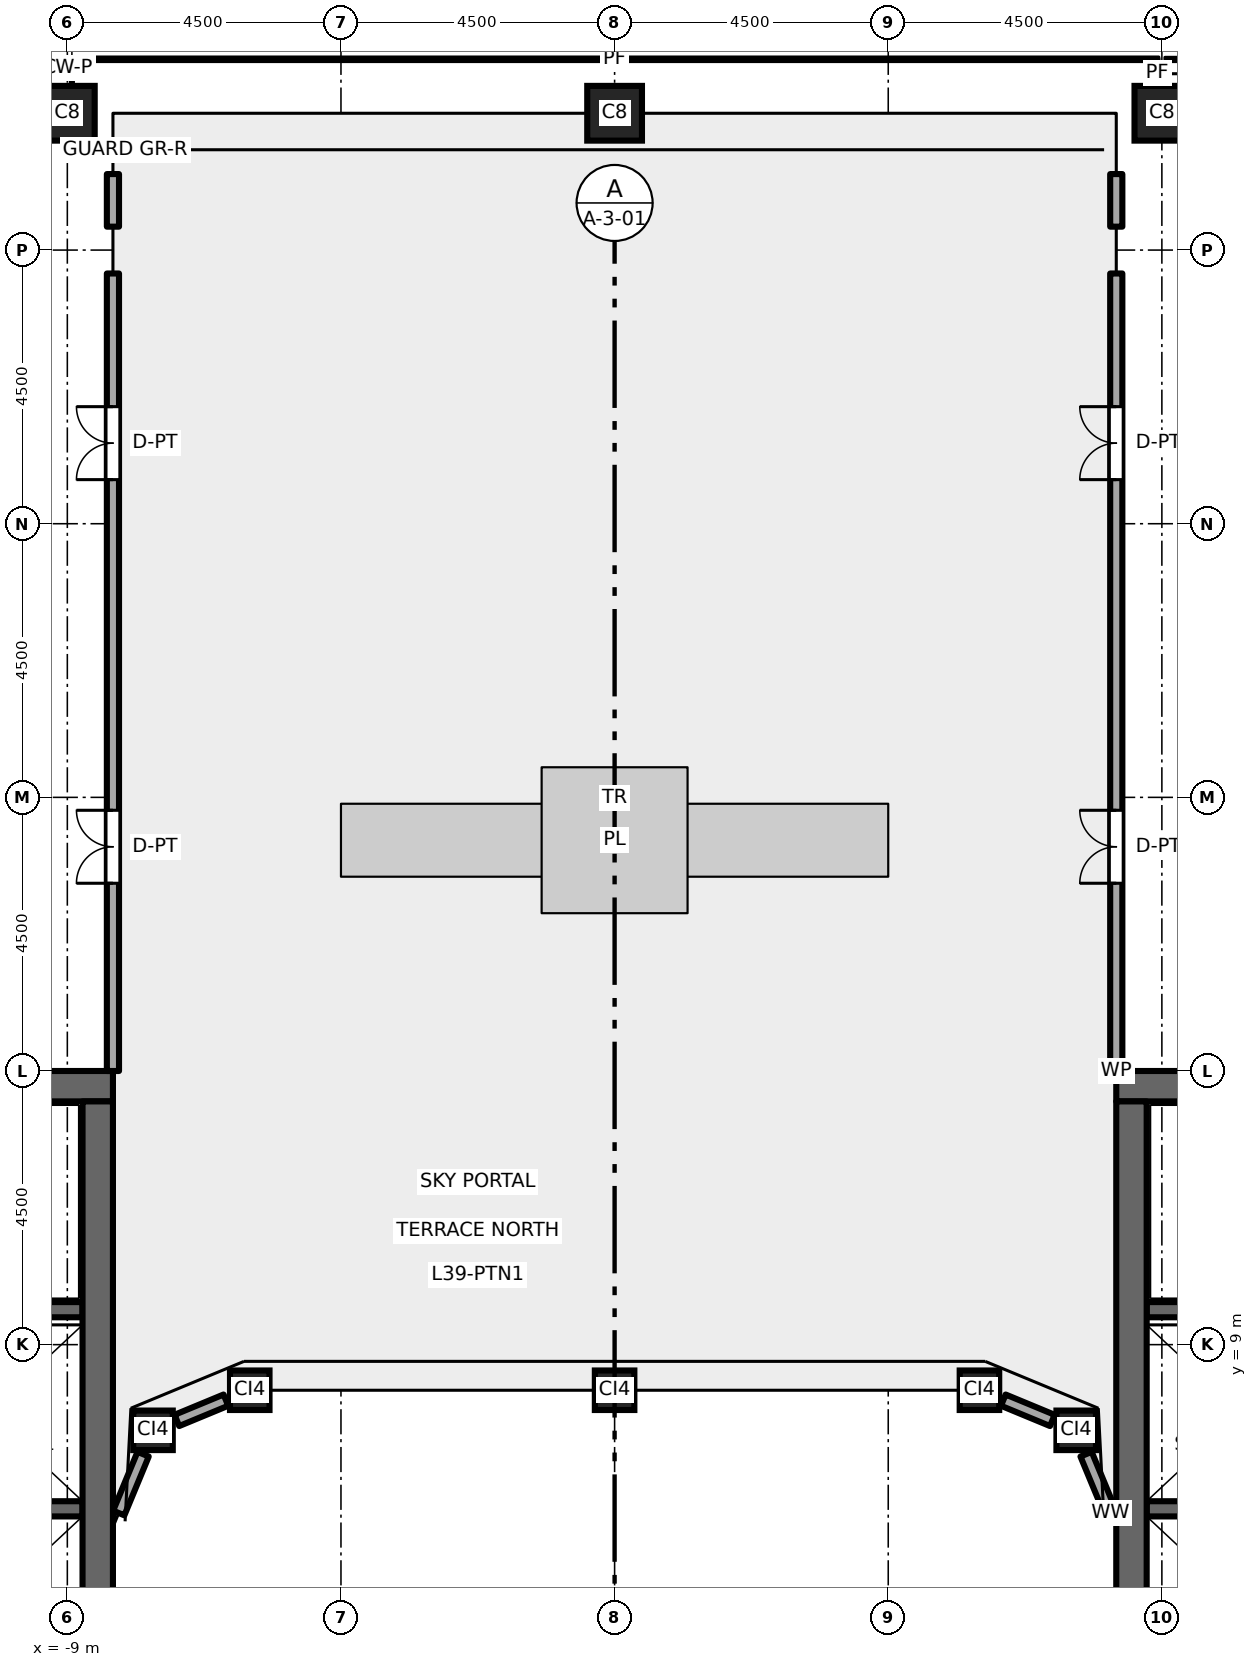
"""IFC4 building model, lengths in metres.
Left out: names, types, materials, properties, quantities, classifications, styles, units other than length and angle.
Written with IfcOpenShell. Run it as: python <this file> out.ifc"""

import sys

from ifc_helpers import new_model, si_unit, direction, frame, frame_2d, origin, origin_2d, place, context, subcontext, project, spatial, rectangle, hollow_rectangle, extrude, element, fill, save


model = new_model("IFC4")
c1 = context("Model", 3, precision=1e-05, world=origin(), true_north=direction((0.0, 1.0)))
c2 = subcontext(c1, "Body", "Model", "MODEL_VIEW")
j1 = project(units=[si_unit("LENGTHUNIT", "METRE"), si_unit("PLANEANGLEUNIT", "RADIAN")], contexts=[c1])
p1 = place(None, origin())
s1 = spatial("IfcSite", under=j1, at=p1, CompositionType="ELEMENT")
p2 = place(p1, origin())
s2 = spatial("IfcBuilding", under=s1, at=p2, CompositionType="ELEMENT")
p3 = place(p2, frame((0.0, 0.0, 181.2)))
s3 = spatial("IfcBuildingStorey", under=s2, at=p3, CompositionType="ELEMENT", Elevation=181.2)
for number, where, z_axis, x_axis in (
    (1, (9.0, 29.25, 0.0), (0.0, 0.0, 1.0), (1.0, 0.0, 0.0)),
    (2, (0.0, 29.25, 0.0), (0.0, 0.0, 1.0), (1.0, 0.0, 0.0)),
    (3, (-9.0, 29.25, 0.0), (0.0, 0.0, 1.0), (1.0, 0.0, 0.0)),
):
    element("IfcColumn", number, at=place(p3, frame(where, z_axis=z_axis, x_axis=x_axis)), inside=s3, PredefinedType="COLUMN", context=c2, shape_type="SweptSolid", body=[
        extrude(hollow_rectangle(XDim=0.9, YDim=0.9, WallThickness=0.05, at=origin_2d()), origin(), (0.0, 0.0, 1.0), 6.0),
    ])
for number, where, z_axis, x_axis in (
    (4, (-7.591, 7.591, 0.0), (0.0, 0.0, 1.0), (1.0, 0.0, 0.0)),
    (5, (-6.0, 8.25, 0.0), (0.0, 0.0, 1.0), (1.0, 0.0, 0.0)),
    (6, (0.0, 8.25, 0.0), (0.0, 0.0, 1.0), (1.0, 0.0, 0.0)),
    (7, (6.0, 8.25, 0.0), (0.0, 0.0, 1.0), (1.0, 0.0, 0.0)),
    (8, (7.591, 7.591, 0.0), (0.0, 0.0, 1.0), (1.0, 0.0, 0.0)),
):
    element("IfcColumn", number, at=place(p3, frame(where, z_axis=z_axis, x_axis=x_axis)), inside=s3, PredefinedType="COLUMN", context=c2, shape_type="SweptSolid", body=[
        extrude(hollow_rectangle(XDim=0.65, YDim=0.65, WallThickness=0.036, at=origin_2d()), origin(), (0.0, 0.0, 1.0), 6.0),
    ])
p4 = place(p3, frame((-8.75, 6.3, 0.0), z_axis=(0.0, 0.0, 1.0), x_axis=(-1.0, 0.0, 0.0)))
e9 = element("IfcWall", 9, at=p4, inside=s3, PredefinedType="SHEAR", context=c2, shape_type="SweptSolid", body=[
    extrude(rectangle(XDim=3.1, YDim=0.25, at=frame_2d((1.55, 0.0))), origin(), (0.0, 0.0, 1.0), 5.8),
])
p5 = place(p3, frame((-8.75, 9.575, 0.0), z_axis=(0.0, 0.0, 1.0), x_axis=(-1.0, 0.0, 0.0)))
e10 = element("IfcWall", 10, at=p5, inside=s3, PredefinedType="SHEAR", context=c2, shape_type="SweptSolid", body=[
    extrude(rectangle(XDim=8.0, YDim=0.25, at=frame_2d((4.0, 0.0))), origin(), (0.0, 0.0, 1.0), 5.8),
])
p6 = place(p5, frame((6.65, 0.0, 0.0)))
e11 = element("IfcOpeningElement", 11, at=p6, cuts=e10, PredefinedType="OPENING", context=c2, shape_type="SweptSolid", body=[
    extrude(rectangle(XDim=1.1, YDim=2.1, at=frame_2d((0.55, 1.05))), frame((0.0, 0.135, 0.0), z_axis=(0.0, -1.0, 0.0), x_axis=(1.0, 0.0, 0.0)), (0.0, 0.0, 1.0), 0.27),
])
p7 = place(p3, frame((-8.25, 13.25, 0.0), z_axis=(0.0, 0.0, 1.0), x_axis=(-1.0, 0.0, 0.0)))
e12 = element("IfcWall", 12, at=p7, inside=s3, PredefinedType="SHEAR", context=c2, shape_type="SweptSolid", body=[
    extrude(rectangle(XDim=13.5, YDim=0.5, at=frame_2d((6.75, 0.0))), origin(), (0.0, 0.0, 1.0), 5.8),
])
p8 = place(p3, frame((-8.5, -13.0, 0.0), z_axis=(0.0, 0.0, 1.0), x_axis=(0.0, 1.0, 0.0)))
e13 = element("IfcWall", 13, at=p8, inside=s3, PredefinedType="SHEAR", context=c2, shape_type="SweptSolid", body=[
    extrude(rectangle(XDim=26.0, YDim=0.5, at=frame_2d((13.0, 0.0))), origin(), (0.0, 0.0, 1.0), 5.8),
])
p9 = place(p3, frame((8.75, 6.3, 0.0), z_axis=(0.0, 0.0, 1.0), x_axis=(1.0, 0.0, 0.0)))
e14 = element("IfcWall", 14, at=p9, inside=s3, PredefinedType="SHEAR", context=c2, shape_type="SweptSolid", body=[
    extrude(rectangle(XDim=3.1, YDim=0.25, at=frame_2d((1.55, 0.0))), origin(), (0.0, 0.0, 1.0), 5.8),
])
p10 = place(p3, frame((8.75, 9.575, 0.0), z_axis=(0.0, 0.0, 1.0), x_axis=(1.0, 0.0, 0.0)))
e15 = element("IfcWall", 15, at=p10, inside=s3, PredefinedType="SHEAR", context=c2, shape_type="SweptSolid", body=[
    extrude(rectangle(XDim=8.0, YDim=0.25, at=frame_2d((4.0, 0.0))), origin(), (0.0, 0.0, 1.0), 5.8),
])
p11 = place(p10, frame((6.65, 0.0, 0.0)))
e16 = element("IfcOpeningElement", 16, at=p11, cuts=e15, PredefinedType="OPENING", context=c2, shape_type="SweptSolid", body=[
    extrude(rectangle(XDim=1.1, YDim=2.1, at=frame_2d((0.55, 1.05))), frame((0.0, 0.135, 0.0), z_axis=(0.0, -1.0, 0.0), x_axis=(1.0, 0.0, 0.0)), (0.0, 0.0, 1.0), 0.27),
])
p12 = place(p3, frame((8.25, 13.25, 0.0), z_axis=(0.0, 0.0, 1.0), x_axis=(1.0, 0.0, 0.0)))
e17 = element("IfcWall", 17, at=p12, inside=s3, PredefinedType="SHEAR", context=c2, shape_type="SweptSolid", body=[
    extrude(rectangle(XDim=13.5, YDim=0.5, at=frame_2d((6.75, 0.0))), origin(), (0.0, 0.0, 1.0), 5.8),
])
p13 = place(p3, frame((8.5, -13.0, 0.0), z_axis=(0.0, 0.0, 1.0), x_axis=(0.0, 1.0, 0.0)))
e18 = element("IfcWall", 18, at=p13, inside=s3, PredefinedType="SHEAR", context=c2, shape_type="SweptSolid", body=[
    extrude(rectangle(XDim=26.0, YDim=0.5, at=frame_2d((13.0, 0.0))), origin(), (0.0, 0.0, 1.0), 5.8),
])
p14 = place(p3, frame((8.154, 6.231, 0.0), z_axis=(0.0, 0.0, 1.0), x_axis=(-0.382694858887, 0.923874799408, 0.0)))
e19 = element("IfcWall", 19, at=p14, inside=s3, PredefinedType="STANDARD", context=c2, shape_type="SweptSolid", body=[
    extrude(rectangle(XDim=1.048, YDim=0.2, at=frame_2d((0.524, 0.0))), origin(), (0.0, 0.0, 1.0), 5.368),
])
for number, where, z_axis, x_axis in (
    (20, (7.199, 7.753, 0.0), (0.0, 0.0, 1.0), (-0.924, 0.383, 0.0)),
    (21, (-6.392, 8.087, 0.0), (0.0, 0.0, 1.0), (-0.924, -0.383, 0.0)),
):
    element("IfcWall", number, at=place(p3, frame(where, z_axis=z_axis, x_axis=x_axis)), inside=s3, PredefinedType="STANDARD", context=c2, shape_type="SweptSolid", body=[
        extrude(rectangle(XDim=0.873, YDim=0.2, at=frame_2d((0.437, 0.0))), origin(), (0.0, 0.0, 1.0), 5.368),
    ])
p15 = place(p3, frame((-7.753, 7.199, 0.0), z_axis=(0.0, 0.0, 1.0), x_axis=(-0.382694858887, -0.923874799408, 0.0)))
e22 = element("IfcWall", 22, at=p15, inside=s3, PredefinedType="STANDARD", context=c2, shape_type="SweptSolid", body=[
    extrude(rectangle(XDim=1.048, YDim=0.2, at=frame_2d((0.524, 0.0))), origin(), (0.0, 0.0, 1.0), 5.368),
])
p16 = place(p3, frame((-8.25, 13.5, 0.0), z_axis=(0.0, 0.0, 1.0), x_axis=(0.0, 1.0, 0.0)))
e23 = element("IfcWall", 23, at=p16, inside=s3, PredefinedType="STANDARD", context=c2, shape_type="SweptSolid", body=[
    extrude(rectangle(XDim=13.115, YDim=0.2, at=frame_2d((6.558, 0.0))), origin(), (0.0, 0.0, 1.0), 5.8),
])
p17 = place(p16, frame((3.087, 0.0, 0.0)))
e24 = element("IfcOpeningElement", 24, at=p17, cuts=e23, PredefinedType="OPENING", context=c2, shape_type="SweptSolid", body=[
    extrude(rectangle(XDim=1.2, YDim=2.4, at=frame_2d((0.6, 1.2))), frame((0.0, 0.11, 0.0), z_axis=(0.0, -1.0, 0.0), x_axis=(1.0, 0.0, 0.0)), (0.0, 0.0, 1.0), 0.22),
])
p18 = place(p16, frame((9.725, 0.0, 0.0)))
e25 = element("IfcOpeningElement", 25, at=p18, cuts=e23, PredefinedType="OPENING", context=c2, shape_type="SweptSolid", body=[
    extrude(rectangle(XDim=1.2, YDim=2.4, at=frame_2d((0.6, 1.2))), frame((0.0, 0.11, 0.0), z_axis=(0.0, -1.0, 0.0), x_axis=(1.0, 0.0, 0.0)), (0.0, 0.0, 1.0), 0.22),
])
p19 = place(p3, frame((-8.25, 27.385, 0.0), z_axis=(0.0, 0.0, 1.0), x_axis=(0.0, 1.0, 0.0)))
e26 = element("IfcWall", 26, at=p19, inside=s3, PredefinedType="STANDARD", context=c2, shape_type="SweptSolid", body=[
    extrude(rectangle(XDim=0.865, YDim=0.2, at=frame_2d((0.433, 0.0))), origin(), (0.0, 0.0, 1.0), 5.8),
])
p20 = place(p3, frame((8.25, 13.5, 0.0), z_axis=(0.0, 0.0, 1.0), x_axis=(0.0, 1.0, 0.0)))
e27 = element("IfcWall", 27, at=p20, inside=s3, PredefinedType="STANDARD", context=c2, shape_type="SweptSolid", body=[
    extrude(rectangle(XDim=13.115, YDim=0.2, at=frame_2d((6.558, 0.0))), origin(), (0.0, 0.0, 1.0), 5.8),
])
p21 = place(p20, frame((3.087, 0.0, 0.0)))
e28 = element("IfcOpeningElement", 28, at=p21, cuts=e27, PredefinedType="OPENING", context=c2, shape_type="SweptSolid", body=[
    extrude(rectangle(XDim=1.2, YDim=2.4, at=frame_2d((0.6, 1.2))), frame((0.0, 0.11, 0.0), z_axis=(0.0, -1.0, 0.0), x_axis=(1.0, 0.0, 0.0)), (0.0, 0.0, 1.0), 0.22),
])
p22 = place(p20, frame((9.725, 0.0, 0.0)))
e29 = element("IfcOpeningElement", 29, at=p22, cuts=e27, PredefinedType="OPENING", context=c2, shape_type="SweptSolid", body=[
    extrude(rectangle(XDim=1.2, YDim=2.4, at=frame_2d((0.6, 1.2))), frame((0.0, 0.11, 0.0), z_axis=(0.0, -1.0, 0.0), x_axis=(1.0, 0.0, 0.0)), (0.0, 0.0, 1.0), 0.22),
])
p23 = place(p3, frame((8.25, 27.385, 0.0), z_axis=(0.0, 0.0, 1.0), x_axis=(0.0, 1.0, 0.0)))
e30 = element("IfcWall", 30, at=p23, inside=s3, PredefinedType="STANDARD", context=c2, shape_type="SweptSolid", body=[
    extrude(rectangle(XDim=0.865, YDim=0.2, at=frame_2d((0.433, 0.0))), origin(), (0.0, 0.0, 1.0), 5.8),
])
p24 = place(p17, origin())
e31 = element("IfcDoor", 31, at=p24, inside=s3, OperationType="DOUBLE_DOOR_SINGLE_SWING", PredefinedType="DOOR", context=c2, shape_type="SweptSolid", body=[
    extrude(rectangle(XDim=1.2, YDim=2.4, at=frame_2d((0.6, 1.2))), frame((0.0, 0.025, 0.0), z_axis=(0.0, -1.0, 0.0), x_axis=(1.0, 0.0, 0.0)), (0.0, 0.0, 1.0), 0.05),
])
fill(e24, e31)
p25 = place(p18, origin())
e32 = element("IfcDoor", 32, at=p25, inside=s3, OperationType="DOUBLE_DOOR_SINGLE_SWING", PredefinedType="DOOR", context=c2, shape_type="SweptSolid", body=[
    extrude(rectangle(XDim=1.2, YDim=2.4, at=frame_2d((0.6, 1.2))), frame((0.0, 0.025, 0.0), z_axis=(0.0, -1.0, 0.0), x_axis=(1.0, 0.0, 0.0)), (0.0, 0.0, 1.0), 0.05),
])
fill(e25, e32)
p26 = place(p21, origin())
e33 = element("IfcDoor", 33, at=p26, inside=s3, OperationType="DOUBLE_DOOR_SINGLE_SWING", PredefinedType="DOOR", context=c2, shape_type="SweptSolid", body=[
    extrude(rectangle(XDim=1.2, YDim=2.4, at=frame_2d((0.6, 1.2))), frame((0.0, 0.025, 0.0), z_axis=(0.0, -1.0, 0.0), x_axis=(1.0, 0.0, 0.0)), (0.0, 0.0, 1.0), 0.05),
])
fill(e28, e33)
p27 = place(p22, origin())
e34 = element("IfcDoor", 34, at=p27, inside=s3, OperationType="DOUBLE_DOOR_SINGLE_SWING", PredefinedType="DOOR", context=c2, shape_type="SweptSolid", body=[
    extrude(rectangle(XDim=1.2, YDim=2.4, at=frame_2d((0.6, 1.2))), frame((0.0, 0.025, 0.0), z_axis=(0.0, -1.0, 0.0), x_axis=(1.0, 0.0, 0.0)), (0.0, 0.0, 1.0), 0.05),
])
fill(e29, e34)
save(model, sys.argv[1])
